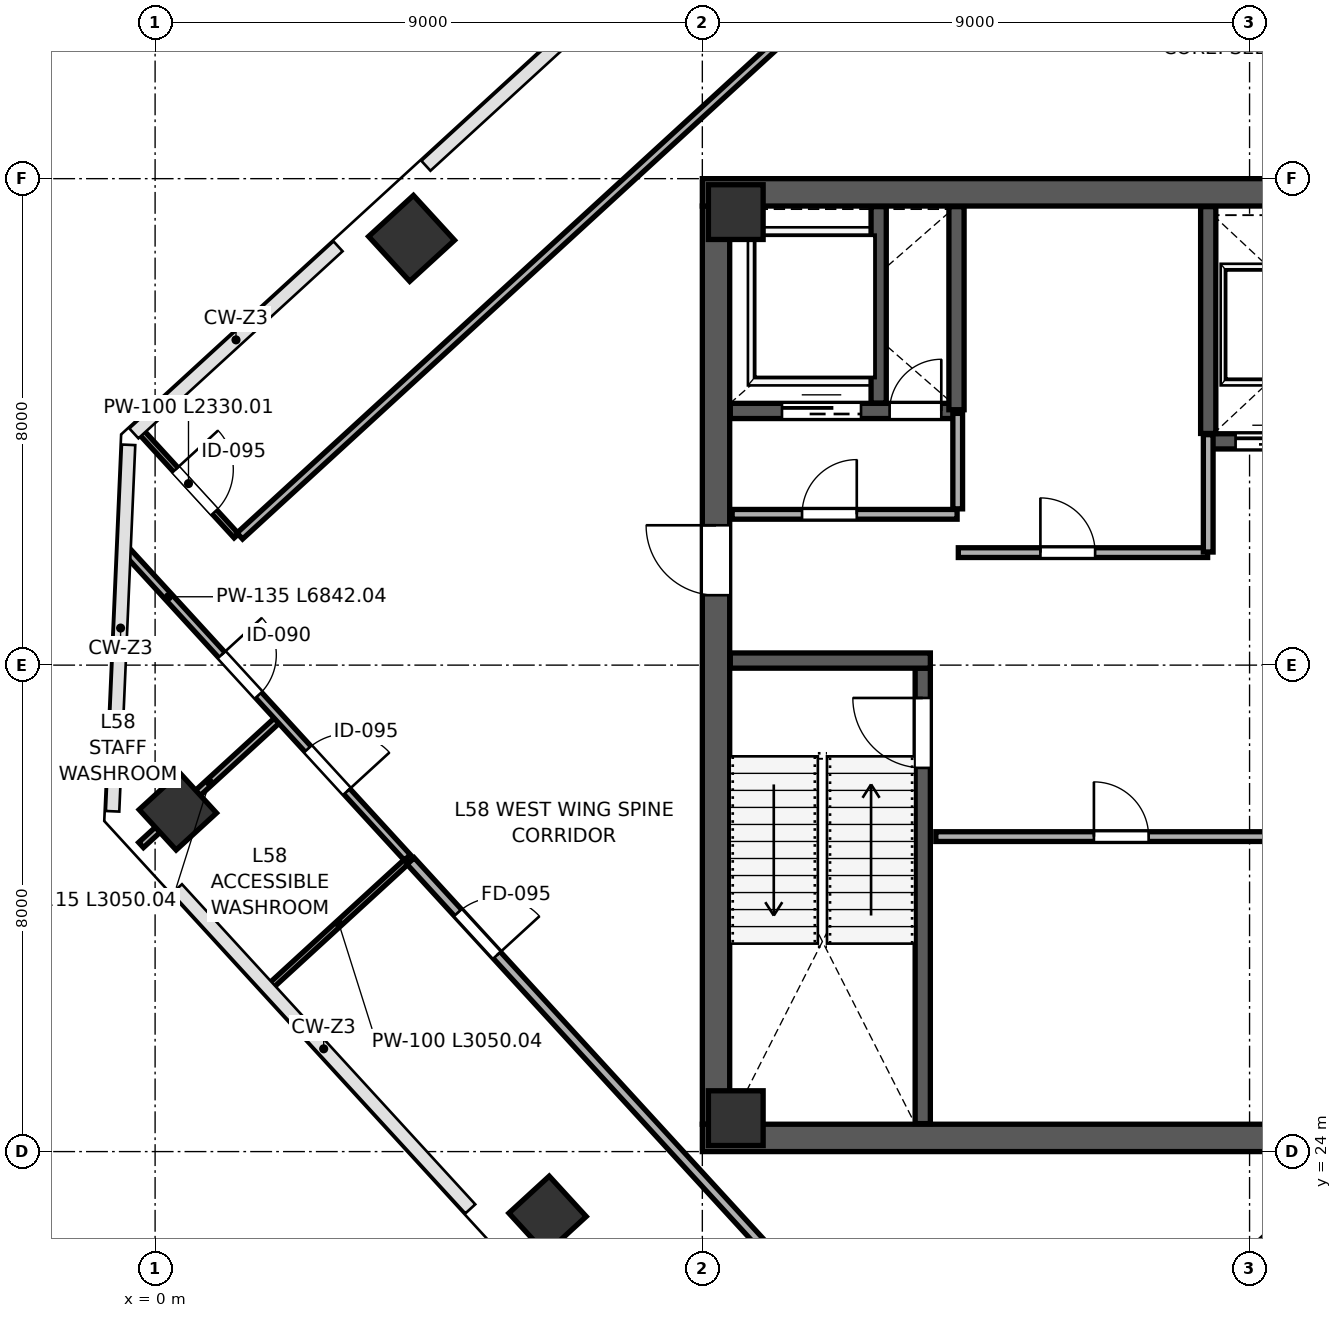
"""IFC4 building model, lengths in metres.
Left out: names, types, materials, properties, quantities, classifications, styles, units other than length and angle.
Written with IfcOpenShell. Run it as: python <this file> out.ifc"""

import sys

from ifc_helpers import new_model, si_unit, direction, frame, frame_2d, origin, origin_2d, place, context, subcontext, project, spatial, rectangle, extrude, source, transform, mapped, element, fill, save


model = new_model("IFC4")
c1 = context("Model", 3, precision=1e-05, world=origin(), true_north=direction((0.0, 1.0)))
c2 = subcontext(c1, "Body", "Model", "MODEL_VIEW")
j1 = project(units=[si_unit("LENGTHUNIT", "METRE"), si_unit("PLANEANGLEUNIT", "RADIAN")], contexts=[c1])
p1 = place(None, origin())
s1 = spatial("IfcSite", under=j1, at=p1, CompositionType="ELEMENT")
p2 = place(p1, origin())
s2 = spatial("IfcBuilding", under=s1, at=p2, CompositionType="ELEMENT")
p3 = place(p2, frame((0.0, 0.0, 258.4)))
s3 = spatial("IfcBuildingStorey", under=s2, at=p3, CompositionType="ELEMENT", Elevation=258.4)
m1 = source(origin(), c2, "Body", "SweptSolid", [
    extrude(rectangle(XDim=0.9, YDim=0.9, at=origin_2d()), origin(), (0.0, 0.0, 1.0), 4.199),
])
for number, where, z_axis, x_axis in (
    (1, (9.55, 24.55, 0.001), (0.0, 0.0, 1.0), (1.0, 0.0, 0.0)),
    (2, (9.55, 39.45, 0.001), (0.0, 0.0, 1.0), (1.0, 0.0, 0.0)),
):
    element("IfcColumn", number, at=place(p3, frame(where, z_axis=z_axis, x_axis=x_axis)), inside=s3, PredefinedType="COLUMN", context=c2, shape_type="MappedRepresentation", body=[
        mapped(m1, transform((0.0, 0.0, 0.0), scale=1.0)),
    ])
m2 = source(origin(), c2, "Body", "SweptSolid", [
    extrude(rectangle(XDim=0.9, YDim=0.9, at=origin_2d()), origin(), (0.0, 0.0, 1.0), 4.199),
])
for number, where, z_axis, x_axis in (
    (3, (0.374, 29.596, 0.001), (0.0, 0.0, 1.0), (-0.676, 0.737, 0.0)),
    (4, (6.454, 22.96, 0.001), (0.0, 0.0, 1.0), (-0.676, 0.737, 0.0)),
):
    element("IfcColumn", number, at=place(p3, frame(where, z_axis=z_axis, x_axis=x_axis)), inside=s3, PredefinedType="COLUMN", context=c2, shape_type="MappedRepresentation", body=[
        mapped(m2, transform((0.0, 0.0, 0.0), scale=1.0)),
    ])
m3 = source(origin(), c2, "Body", "SweptSolid", [
    extrude(rectangle(XDim=1.0, YDim=1.0, at=origin_2d()), origin(), (0.0, 0.0, 1.0), 4.199),
])
p4 = place(p3, frame((4.218, 39.018, 0.001), z_axis=(0.0, 0.0, 1.0), x_axis=(-0.675590207616, 0.73727733681, 0.0)))
e5 = element("IfcColumn", 5, at=p4, inside=s3, PredefinedType="COLUMN", context=c2, shape_type="MappedRepresentation", body=[
    mapped(m3, transform((0.0, 0.0, 0.0), scale=1.0)),
])
p5 = place(p3, frame((9.225, 24.45, 0.0), z_axis=(0.0, 0.0, 1.0), x_axis=(0.0, 1.0, 0.0)))
e6 = element("IfcWall", 6, at=p5, inside=s3, PredefinedType="SHEAR", context=c2, shape_type="SweptSolid", body=[
    extrude(rectangle(XDim=15.1, YDim=0.45, at=frame_2d((7.55, 0.0))), origin(), (0.0, 0.0, 1.0), 3.96),
])
p6 = place(p5, frame((8.7, 0.0, 0.0)))
e7 = element("IfcOpeningElement", 7, at=p6, cuts=e6, PredefinedType="OPENING", context=c2, shape_type="SweptSolid", body=[
    extrude(rectangle(XDim=1.15, YDim=2.2, at=frame_2d((0.575, 1.1))), frame((0.0, 0.235, 0.0), z_axis=(0.0, -1.0, 0.0), x_axis=(1.0, 0.0, 0.0)), (0.0, 0.0, 1.0), 0.47),
])
for number, where, z_axis, x_axis in (
    (8, (9.0, 24.225, 0.0), (0.0, 0.0, 1.0), (1.0, 0.0, 0.0)),
    (9, (9.0, 39.775, 0.0), (0.0, 0.0, 1.0), (1.0, 0.0, 0.0)),
):
    element("IfcWall", number, at=place(p3, frame(where, z_axis=z_axis, x_axis=x_axis)), inside=s3, PredefinedType="SHEAR", context=c2, shape_type="SweptSolid", body=[
        extrude(rectangle(XDim=18.0, YDim=0.45, at=frame_2d((9.0, 0.0))), origin(), (0.0, 0.0, 1.0), 3.96),
    ])
p7 = place(p3, frame((12.625, 24.46, 0.0), z_axis=(0.0, 0.0, 1.0), x_axis=(0.0, 1.0, 0.0)))
e10 = element("IfcWall", 10, at=p7, inside=s3, PredefinedType="SHEAR", context=c2, shape_type="SweptSolid", body=[
    extrude(rectangle(XDim=7.49, YDim=0.25, at=frame_2d((3.745, 0.0))), origin(), (0.0, 0.0, 1.0), 3.96),
])
p8 = place(p7, frame((5.85, 0.0, 0.0)))
e11 = element("IfcOpeningElement", 11, at=p8, cuts=e10, PredefinedType="OPENING", context=c2, shape_type="SweptSolid", body=[
    extrude(rectangle(XDim=1.15, YDim=2.2, at=frame_2d((0.575, 1.1))), frame((0.0, 0.135, 0.0), z_axis=(0.0, -1.0, 0.0), x_axis=(1.0, 0.0, 0.0)), (0.0, 0.0, 1.0), 0.27),
])
p9 = place(p3, frame((9.46, 32.075, 0.0), z_axis=(0.0, 0.0, 1.0), x_axis=(1.0, 0.0, 0.0)))
e12 = element("IfcWall", 12, at=p9, inside=s3, PredefinedType="SHEAR", context=c2, shape_type="SweptSolid", body=[
    extrude(rectangle(XDim=3.29, YDim=0.25, at=frame_2d((1.645, 0.0))), origin(), (0.0, 0.0, 1.0), 3.96),
])
p10 = place(p3, frame((9.46, 36.18, 0.0), z_axis=(0.0, 0.0, 1.0), x_axis=(1.0, 0.0, 0.0)))
e13 = element("IfcWall", 13, at=p10, inside=s3, PredefinedType="SHEAR", context=c2, shape_type="SweptSolid", body=[
    extrude(rectangle(XDim=3.79, YDim=0.25, at=frame_2d((1.895, 0.0))), origin(), (0.0, 0.0, 1.0), 3.96),
])
p11 = place(p10, frame((2.62, 0.0, 0.0)))
e14 = element("IfcOpeningElement", 14, at=p11, cuts=e13, PredefinedType="OPENING", context=c2, shape_type="SweptSolid", body=[
    extrude(rectangle(XDim=0.85, YDim=2.1, at=frame_2d((0.425, 1.05))), frame((0.0, 0.135, 0.0), z_axis=(0.0, -1.0, 0.0), x_axis=(1.0, 0.0, 0.0)), (0.0, 0.0, 1.0), 0.27),
])
p12 = place(p10, frame((0.85, 0.0, 0.0)))
e15 = element("IfcOpeningElement", 15, at=p12, cuts=e13, PredefinedType="OPENING", context=c2, shape_type="SweptSolid", body=[
    extrude(rectangle(XDim=1.3, YDim=2.25, at=frame_2d((0.65, 1.125))), frame((0.0, 0.135, 0.0), z_axis=(0.0, -1.0, 0.0), x_axis=(1.0, 0.0, 0.0)), (0.0, 0.0, 1.0), 0.27),
])
p13 = place(p3, frame((11.9, 36.31, 0.0), z_axis=(0.0, 0.0, 1.0), x_axis=(0.0, 1.0, 0.0)))
e16 = element("IfcWall", 16, at=p13, inside=s3, PredefinedType="SHEAR", context=c2, shape_type="SweptSolid", body=[
    extrude(rectangle(XDim=3.23, YDim=0.25, at=frame_2d((1.615, 0.0))), origin(), (0.0, 0.0, 1.0), 3.96),
])
p14 = place(p3, frame((13.18, 36.2, 0.0), z_axis=(0.0, 0.0, 1.0), x_axis=(0.0, 1.0, 0.0)))
e17 = element("IfcWall", 17, at=p14, inside=s3, PredefinedType="SHEAR", context=c2, shape_type="SweptSolid", body=[
    extrude(rectangle(XDim=3.34, YDim=0.25, at=frame_2d((1.67, 0.0))), origin(), (0.0, 0.0, 1.0), 3.96),
])
p15 = place(p3, frame((17.32, 35.68, 0.0), z_axis=(0.0, 0.0, 1.0), x_axis=(1.0, 0.0, 0.0)))
e18 = element("IfcWall", 18, at=p15, inside=s3, PredefinedType="SHEAR", context=c2, shape_type="SweptSolid", body=[
    extrude(rectangle(XDim=3.87, YDim=0.25, at=frame_2d((1.935, 0.0))), origin(), (0.0, 0.0, 1.0), 3.96),
])
p16 = place(p15, frame((0.45, 0.0, 0.0)))
e19 = element("IfcOpeningElement", 19, at=p16, cuts=e18, PredefinedType="OPENING", context=c2, shape_type="SweptSolid", body=[
    extrude(rectangle(XDim=1.1, YDim=2.2, at=frame_2d((0.55, 1.1))), frame((0.0, 0.135, 0.0), z_axis=(0.0, -1.0, 0.0), x_axis=(1.0, 0.0, 0.0)), (0.0, 0.0, 1.0), 0.27),
])
p17 = place(p15, frame((2.35, 0.0, 0.0)))
e20 = element("IfcOpeningElement", 20, at=p17, cuts=e18, PredefinedType="OPENING", context=c2, shape_type="SweptSolid", body=[
    extrude(rectangle(XDim=1.1, YDim=2.2, at=frame_2d((0.55, 1.1))), frame((0.0, 0.135, 0.0), z_axis=(0.0, -1.0, 0.0), x_axis=(1.0, 0.0, 0.0)), (0.0, 0.0, 1.0), 0.27),
])
p18 = place(p3, frame((17.32, 35.81, 0.0), z_axis=(0.0, 0.0, 1.0), x_axis=(0.0, 1.0, 0.0)))
e21 = element("IfcWall", 21, at=p18, inside=s3, PredefinedType="SHEAR", context=c2, shape_type="SweptSolid", body=[
    extrude(rectangle(XDim=3.73, YDim=0.25, at=frame_2d((1.865, 0.0))), origin(), (0.0, 0.0, 1.0), 3.96),
])
p19 = place(p3, frame((9.49, 34.48, 0.0), z_axis=(0.0, 0.0, 1.0), x_axis=(1.0, 0.0, 0.0)))
e22 = element("IfcWall", 22, at=p19, inside=s3, PredefinedType="PARTITIONING", context=c2, shape_type="SweptSolid", body=[
    extrude(rectangle(XDim=3.7, YDim=0.16, at=frame_2d((1.85, 0.0))), origin(), (0.0, 0.0, 1.0), 3.96),
])
p20 = place(p19, frame((1.15, 0.0, 0.0)))
e23 = element("IfcOpeningElement", 23, at=p20, cuts=e22, PredefinedType="OPENING", context=c2, shape_type="SweptSolid", body=[
    extrude(rectangle(XDim=0.9, YDim=2.15, at=frame_2d((0.45, 1.075))), frame((0.0, 0.09, 0.0), z_axis=(0.0, -1.0, 0.0), x_axis=(1.0, 0.0, 0.0)), (0.0, 0.0, 1.0), 0.18),
])
p21 = place(p3, frame((13.2, 34.57, 0.0), z_axis=(0.0, 0.0, 1.0), x_axis=(0.0, 1.0, 0.0)))
e24 = element("IfcWall", 24, at=p21, inside=s3, PredefinedType="PARTITIONING", context=c2, shape_type="SweptSolid", body=[
    extrude(rectangle(XDim=1.57, YDim=0.16, at=frame_2d((0.785, 0.0))), origin(), (0.0, 0.0, 1.0), 3.96),
])
p22 = place(p3, frame((13.21, 33.85, 0.0), z_axis=(0.0, 0.0, 1.0), x_axis=(1.0, 0.0, 0.0)))
e25 = element("IfcWall", 25, at=p22, inside=s3, PredefinedType="PARTITIONING", context=c2, shape_type="SweptSolid", body=[
    extrude(rectangle(XDim=4.1, YDim=0.16, at=frame_2d((2.05, 0.0))), origin(), (0.0, 0.0, 1.0), 3.96),
])
p23 = place(p22, frame((1.35, 0.0, 0.0)))
e26 = element("IfcOpeningElement", 26, at=p23, cuts=e25, PredefinedType="OPENING", context=c2, shape_type="SweptSolid", body=[
    extrude(rectangle(XDim=0.9, YDim=2.15, at=frame_2d((0.45, 1.075))), frame((0.0, 0.09, 0.0), z_axis=(0.0, -1.0, 0.0), x_axis=(1.0, 0.0, 0.0)), (0.0, 0.0, 1.0), 0.18),
])
p24 = place(p3, frame((17.32, 33.86, 0.0), z_axis=(0.0, 0.0, 1.0), x_axis=(0.0, 1.0, 0.0)))
e27 = element("IfcWall", 27, at=p24, inside=s3, PredefinedType="PARTITIONING", context=c2, shape_type="SweptSolid", body=[
    extrude(rectangle(XDim=1.93, YDim=0.16, at=frame_2d((0.965, 0.0))), origin(), (0.0, 0.0, 1.0), 3.96),
])
p25 = place(p3, frame((12.84, 29.18, 0.0), z_axis=(0.0, 0.0, 1.0), x_axis=(1.0, 0.0, 0.0)))
e28 = element("IfcWall", 28, at=p25, inside=s3, PredefinedType="PARTITIONING", context=c2, shape_type="SweptSolid", body=[
    extrude(rectangle(XDim=8.37, YDim=0.16, at=frame_2d((4.185, 0.0))), origin(), (0.0, 0.0, 1.0), 3.96),
])
p26 = place(p25, frame((2.6, 0.0, 0.0)))
e29 = element("IfcOpeningElement", 29, at=p26, cuts=e28, PredefinedType="OPENING", context=c2, shape_type="SweptSolid", body=[
    extrude(rectangle(XDim=0.9, YDim=2.15, at=frame_2d((0.45, 1.075))), frame((0.0, 0.09, 0.0), z_axis=(0.0, -1.0, 0.0), x_axis=(1.0, 0.0, 0.0)), (0.0, 0.0, 1.0), 0.18),
])
p27 = place(p3, frame((-0.231, 29.042, 0.0), z_axis=(0.0, 0.0, 1.0), x_axis=(0.737290351983, 0.675576003772, 0.0)))
e30 = element("IfcWall", 30, at=p27, inside=s3, PredefinedType="PARTITIONING", context=c2, shape_type="SweptSolid", body=[
    extrude(rectangle(XDim=3.05, YDim=0.115, at=frame_2d((1.525, 0.0))), origin(), (0.0, 0.0, 1.0), 3.295),
])
p28 = place(p3, frame((1.897, 26.719, 0.0), z_axis=(0.0, 0.0, 1.0), x_axis=(0.737290351983, 0.675576003772, 0.0)))
e31 = element("IfcWall", 31, at=p28, inside=s3, PredefinedType="PARTITIONING", context=c2, shape_type="SweptSolid", body=[
    extrude(rectangle(XDim=3.05, YDim=0.1, at=frame_2d((1.525, 0.0))), origin(), (0.0, 0.0, 1.0), 3.295),
])
p29 = place(p3, frame((-0.474, 33.881, 0.0), z_axis=(0.0, 0.0, 1.0), x_axis=(0.675605050901, -0.73726373517, 0.0)))
e32 = element("IfcWall", 32, at=p29, inside=s3, PredefinedType="PARTITIONING", context=c2, shape_type="SweptSolid", body=[
    extrude(rectangle(XDim=6.842, YDim=0.135, at=frame_2d((3.421, 0.0))), origin(), (0.0, 0.0, 1.0), 3.96),
])
p30 = place(p29, frame((2.32, 0.0, 0.0)))
e33 = element("IfcOpeningElement", 33, at=p30, cuts=e32, PredefinedType="OPENING", context=c2, shape_type="SweptSolid", body=[
    extrude(rectangle(XDim=0.9, YDim=2.15, at=frame_2d((0.45, 1.075))), frame((0.0, 0.078, 0.0), z_axis=(0.0, -1.0, 0.0), x_axis=(1.0, 0.0, 0.0)), (0.0, 0.0, 1.0), 0.155),
])
p31 = place(p29, frame((4.42, 0.0, 0.0)))
e34 = element("IfcOpeningElement", 34, at=p31, cuts=e32, PredefinedType="OPENING", context=c2, shape_type="SweptSolid", body=[
    extrude(rectangle(XDim=0.95, YDim=2.15, at=frame_2d((0.475, 1.075))), frame((0.0, 0.078, 0.0), z_axis=(0.0, -1.0, 0.0), x_axis=(1.0, 0.0, 0.0)), (0.0, 0.0, 1.0), 0.155),
])
p32 = place(p3, frame((4.203, 28.778, 0.0), z_axis=(0.0, 0.0, 1.0), x_axis=(0.675591041558, -0.737276572642, 0.0)))
e35 = element("IfcWall", 35, at=p32, inside=s3, PredefinedType="PARTITIONING", context=c2, shape_type="SweptSolid", body=[
    extrude(rectangle(XDim=14.07, YDim=0.16, at=frame_2d((7.035, 0.0))), origin(), (0.0, 0.0, 1.0), 3.96),
])
p33 = place(p32, frame((1.15, 0.0, 0.0)))
e36 = element("IfcOpeningElement", 36, at=p33, cuts=e35, PredefinedType="OPENING", context=c2, shape_type="SweptSolid", body=[
    extrude(rectangle(XDim=0.95, YDim=2.15, at=frame_2d((0.475, 1.075))), frame((0.0, 0.09, 0.0), z_axis=(0.0, -1.0, 0.0), x_axis=(1.0, 0.0, 0.0)), (0.0, 0.0, 1.0), 0.18),
])
p34 = place(p3, frame((13.765, 18.402, 0.0), z_axis=(0.0, 0.0, 1.0), x_axis=(0.737266340408, 0.675602207887, 0.0)))
e37 = element("IfcWall", 37, at=p34, inside=s3, PredefinedType="PARTITIONING", context=c2, shape_type="SweptSolid", body=[
    extrude(rectangle(XDim=8.128, YDim=0.16, at=frame_2d((4.064, 0.0))), origin(), (0.0, 0.0, 1.0), 3.96),
])
p35 = place(p3, frame((-0.238, 35.844, 0.0), z_axis=(0.0, 0.0, 1.0), x_axis=(0.67562972666, -0.737241122329, 0.0)))
e38 = element("IfcWall", 38, at=p35, inside=s3, PredefinedType="PARTITIONING", context=c2, shape_type="SweptSolid", body=[
    extrude(rectangle(XDim=2.33, YDim=0.1, at=frame_2d((1.165, 0.0))), origin(), (0.0, 0.0, 1.0), 3.96),
])
p36 = place(p35, frame((0.85, 0.0, 0.0)))
e39 = element("IfcOpeningElement", 39, at=p36, cuts=e38, PredefinedType="OPENING", context=c2, shape_type="SweptSolid", body=[
    extrude(rectangle(XDim=0.95, YDim=2.15, at=frame_2d((0.475, 1.075))), frame((0.0, 0.06, 0.0), z_axis=(0.0, -1.0, 0.0), x_axis=(1.0, 0.0, 0.0)), (0.0, 0.0, 1.0), 0.12),
])
p37 = place(p3, frame((1.393, 34.124, 0.0), z_axis=(0.0, 0.0, 1.0), x_axis=(0.737274323436, 0.675593496121, 0.0)))
e40 = element("IfcWall", 40, at=p37, inside=s3, PredefinedType="PARTITIONING", context=c2, shape_type="SweptSolid", body=[
    extrude(rectangle(XDim=27.402, YDim=0.135, at=frame_2d((13.701, 0.0))), origin(), (0.0, 0.0, 1.0), 3.96),
])
p38 = place(p3, frame((12.47, 15.181, 0.0), z_axis=(0.0, 0.0, 1.0), x_axis=(0.737265724175, 0.675602880365, 0.0)))
e41 = element("IfcWall", 41, at=p38, inside=s3, PredefinedType="PARTITIONING", context=c2, shape_type="SweptSolid", body=[
    extrude(rectangle(XDim=12.895, YDim=0.16, at=frame_2d((6.448, 0.0))), origin(), (0.0, 0.0, 1.0), 3.96),
])
m4 = source(origin(), c2, "Body", "SweptSolid", [
    extrude(rectangle(XDim=1.15, YDim=2.2, at=frame_2d((0.575, 1.1))), frame((0.0, 0.025, 0.0), z_axis=(0.0, -1.0, 0.0), x_axis=(1.0, 0.0, 0.0)), (0.0, 0.0, 1.0), 0.05),
])
p39 = place(p8, origin())
e42 = element("IfcDoor", 42, at=p39, inside=s3, OperationType="SINGLE_SWING_RIGHT", PredefinedType="DOOR", context=c2, shape_type="MappedRepresentation", body=[
    mapped(m4, transform((0.0, 0.0, 0.0), scale=1.0)),
])
fill(e11, e42)
m5 = source(origin(), c2, "Body", "SweptSolid", [
    extrude(rectangle(XDim=1.15, YDim=2.2, at=frame_2d((0.575, 1.1))), frame((0.0, 0.025, 0.0), z_axis=(0.0, -1.0, 0.0), x_axis=(1.0, 0.0, 0.0)), (0.0, 0.0, 1.0), 0.05),
])
p40 = place(p6, origin())
e43 = element("IfcDoor", 43, at=p40, inside=s3, OperationType="SINGLE_SWING_RIGHT", PredefinedType="DOOR", context=c2, shape_type="MappedRepresentation", body=[
    mapped(m5, transform((0.0, 0.0, 0.0), scale=1.0)),
])
fill(e7, e43)
m6 = source(origin(), c2, "Body", "SweptSolid", [
    extrude(rectangle(XDim=0.85, YDim=2.1, at=frame_2d((0.425, 1.05))), frame((0.0, 0.025, 0.0), z_axis=(0.0, -1.0, 0.0), x_axis=(1.0, 0.0, 0.0)), (0.0, 0.0, 1.0), 0.05),
])
p41 = place(p11, origin())
e44 = element("IfcDoor", 44, at=p41, inside=s3, OperationType="SINGLE_SWING_RIGHT", PredefinedType="DOOR", context=c2, shape_type="MappedRepresentation", body=[
    mapped(m6, transform((0.0, 0.0, 0.0), scale=1.0)),
])
fill(e14, e44)
m7 = source(origin(), c2, "Body", "SweptSolid", [
    extrude(rectangle(XDim=1.1, YDim=2.2, at=frame_2d((0.55, 1.1))), frame((0.0, 0.025, 0.0), z_axis=(0.0, -1.0, 0.0), x_axis=(1.0, 0.0, 0.0)), (0.0, 0.0, 1.0), 0.05),
])
p42 = place(p16, origin())
e45 = element("IfcDoor", 45, at=p42, inside=s3, OperationType="SLIDING_TO_LEFT", PredefinedType="DOOR", context=c2, shape_type="MappedRepresentation", body=[
    mapped(m7, transform((0.0, 0.0, 0.0), scale=1.0)),
])
fill(e19, e45)
m8 = source(origin(), c2, "Body", "SweptSolid", [
    extrude(rectangle(XDim=1.3, YDim=2.25, at=frame_2d((0.65, 1.125))), frame((0.0, 0.025, 0.0), z_axis=(0.0, -1.0, 0.0), x_axis=(1.0, 0.0, 0.0)), (0.0, 0.0, 1.0), 0.05),
])
p43 = place(p12, origin())
e46 = element("IfcDoor", 46, at=p43, inside=s3, OperationType="SLIDING_TO_LEFT", PredefinedType="DOOR", context=c2, shape_type="MappedRepresentation", body=[
    mapped(m8, transform((0.0, 0.0, 0.0), scale=1.0)),
])
fill(e15, e46)
m9 = source(origin(), c2, "Body", "SweptSolid", [
    extrude(rectangle(XDim=0.9, YDim=2.15, at=frame_2d((0.45, 1.075))), frame((0.0, 0.025, 0.0), z_axis=(0.0, -1.0, 0.0), x_axis=(1.0, 0.0, 0.0)), (0.0, 0.0, 1.0), 0.05),
])
p44 = place(p20, origin())
e47 = element("IfcDoor", 47, at=p44, inside=s3, OperationType="SINGLE_SWING_RIGHT", PredefinedType="DOOR", context=c2, shape_type="MappedRepresentation", body=[
    mapped(m9, transform((0.0, 0.0, 0.0), scale=1.0)),
])
fill(e23, e47)
p45 = place(p23, origin())
e48 = element("IfcDoor", 48, at=p45, inside=s3, OperationType="SINGLE_SWING_LEFT", PredefinedType="DOOR", context=c2, shape_type="MappedRepresentation", body=[
    mapped(m9, transform((0.0, 0.0, 0.0), scale=1.0)),
])
fill(e26, e48)
p46 = place(p26, origin())
e49 = element("IfcDoor", 49, at=p46, inside=s3, OperationType="SINGLE_SWING_LEFT", PredefinedType="DOOR", context=c2, shape_type="MappedRepresentation", body=[
    mapped(m9, transform((0.0, 0.0, 0.0), scale=1.0)),
])
fill(e29, e49)
m10 = source(origin(), c2, "Body", "SweptSolid", [
    extrude(rectangle(XDim=0.9, YDim=2.15, at=frame_2d((0.45, 1.075))), frame((0.0, 0.025, 0.0), z_axis=(0.0, -1.0, 0.0), x_axis=(1.0, 0.0, 0.0)), (0.0, 0.0, 1.0), 0.05),
])
p47 = place(p30, origin())
e50 = element("IfcDoor", 50, at=p47, inside=s3, OperationType="SINGLE_SWING_LEFT", PredefinedType="DOOR", context=c2, shape_type="MappedRepresentation", body=[
    mapped(m10, transform((0.0, 0.0, 0.0), scale=1.0)),
])
fill(e33, e50)
m11 = source(origin(), c2, "Body", "SweptSolid", [
    extrude(rectangle(XDim=0.95, YDim=2.15, at=frame_2d((0.475, 1.075))), frame((0.0, 0.025, 0.0), z_axis=(0.0, -1.0, 0.0), x_axis=(1.0, 0.0, 0.0)), (0.0, 0.0, 1.0), 0.05),
])
p48 = place(p31, origin())
e51 = element("IfcDoor", 51, at=p48, inside=s3, OperationType="SINGLE_SWING_RIGHT", PredefinedType="DOOR", context=c2, shape_type="MappedRepresentation", body=[
    mapped(m11, transform((0.0, 0.0, 0.0), scale=1.0)),
])
fill(e34, e51)
m12 = source(origin(), c2, "Body", "SweptSolid", [
    extrude(rectangle(XDim=0.95, YDim=2.15, at=frame_2d((0.475, 1.075))), frame((0.0, 0.025, 0.0), z_axis=(0.0, -1.0, 0.0), x_axis=(1.0, 0.0, 0.0)), (0.0, 0.0, 1.0), 0.05),
])
p49 = place(p33, origin())
e52 = element("IfcDoor", 52, at=p49, inside=s3, OperationType="SINGLE_SWING_RIGHT", PredefinedType="DOOR", context=c2, shape_type="MappedRepresentation", body=[
    mapped(m12, transform((0.0, 0.0, 0.0), scale=1.0)),
])
fill(e36, e52)
p50 = place(p36, origin())
e53 = element("IfcDoor", 53, at=p50, inside=s3, OperationType="SINGLE_SWING_LEFT", PredefinedType="DOOR", context=c2, shape_type="MappedRepresentation", body=[
    mapped(m11, transform((0.0, 0.0, 0.0), scale=1.0)),
])
fill(e39, e53)
save(model, sys.argv[1])
